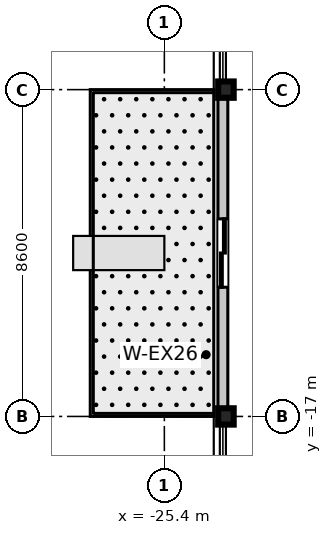
"""IFC4 building model, lengths in metres.
Left out: names, types, materials, properties, quantities, classifications, styles, units other than length and angle.
Written with IfcOpenShell. Run it as: python <this file> out.ifc"""

import sys

from ifc_helpers import new_model, si_unit, direction, frame, frame_2d, origin, origin_2d, place, context, subcontext, project, spatial, rectangle, i_section, extrude, source, transform, mapped, element, fill, save


model = new_model("IFC4")
c1 = context("Model", 3, precision=1e-05, world=origin(), true_north=direction((0.0, 1.0)))
c2 = subcontext(c1, "Body", "Model", "MODEL_VIEW")
j1 = project(units=[si_unit("LENGTHUNIT", "METRE"), si_unit("PLANEANGLEUNIT", "RADIAN")], contexts=[c1])
p1 = place(None, origin())
s1 = spatial("IfcSite", under=j1, at=p1, CompositionType="ELEMENT")
p2 = place(p1, origin())
s2 = spatial("IfcBuilding", under=s1, at=p2, CompositionType="ELEMENT")
p3 = place(p2, frame((0.0, 0.0, 124.8)))
s3 = spatial("IfcBuildingStorey", under=s2, at=p3, CompositionType="ELEMENT", Elevation=124.8)
m1 = source(origin(), c2, "Body", "SweptSolid", [
    extrude(i_section(OverallWidth=0.409, OverallDepth=0.43, WebThickness=0.021, FlangeThickness=0.034, at=origin_2d()), origin(), (0.0, 0.0, 1.0), 3.605),
])
for number, where, z_axis, x_axis in (
    (1, (-23.78, -17.0, 0.0), (0.0, 0.0, 1.0), (1.0, 0.0, 0.0)),
    (2, (-23.78, -8.4, 0.0), (0.0, 0.0, 1.0), (1.0, 0.0, 0.0)),
):
    element("IfcColumn", number, at=place(p3, frame(where, z_axis=z_axis, x_axis=x_axis)), inside=s3, PredefinedType="COLUMN", context=c2, shape_type="MappedRepresentation", body=[
        mapped(m1, transform((0.0, 0.0, 0.0), scale=1.0)),
    ])
m2 = source(origin(), c2, "Body", "SweptSolid", [
    extrude(rectangle(XDim=8.6, YDim=0.26, at=frame_2d((4.3, 0.0))), origin(), (0.0, 0.0, 1.0), 2.86),
])
p4 = place(p3, frame((-23.86, -17.0, 0.0), z_axis=(0.0, 0.0, 1.0), x_axis=(0.0, 1.0, 0.0)))
e3 = element("IfcWall", 3, at=p4, inside=s3, PredefinedType="STANDARD", context=c2, shape_type="MappedRepresentation", body=[
    mapped(m2, transform((0.0, 0.0, 0.0), scale=1.0)),
])
p5 = place(p4, frame((3.4, 0.0, 0.0)))
e4 = element("IfcOpeningElement", 4, at=p5, cuts=e3, PredefinedType="OPENING", context=c2, shape_type="SweptSolid", body=[
    extrude(rectangle(XDim=1.8, YDim=2.25, at=frame_2d((0.9, 1.125))), frame((0.0, 0.14, 0.0), z_axis=(0.0, -1.0, 0.0), x_axis=(1.0, 0.0, 0.0)), (0.0, 0.0, 1.0), 0.28),
])
m3 = source(origin(), c2, "Body", "SweptSolid", [
    extrude(rectangle(XDim=1.8, YDim=2.25, at=frame_2d((0.9, 1.125))), frame((0.0, 0.025, 0.0), z_axis=(0.0, -1.0, 0.0), x_axis=(1.0, 0.0, 0.0)), (0.0, 0.0, 1.0), 0.05),
])
p6 = place(p5, origin())
e5 = element("IfcDoor", 5, at=p6, inside=s3, OperationType="DOUBLE_DOOR_SLIDING", PredefinedType="DOOR", context=c2, shape_type="MappedRepresentation", body=[
    mapped(m3, transform((0.0, 0.0, 0.0), scale=1.0)),
])
fill(e4, e5)
save(model, sys.argv[1])
